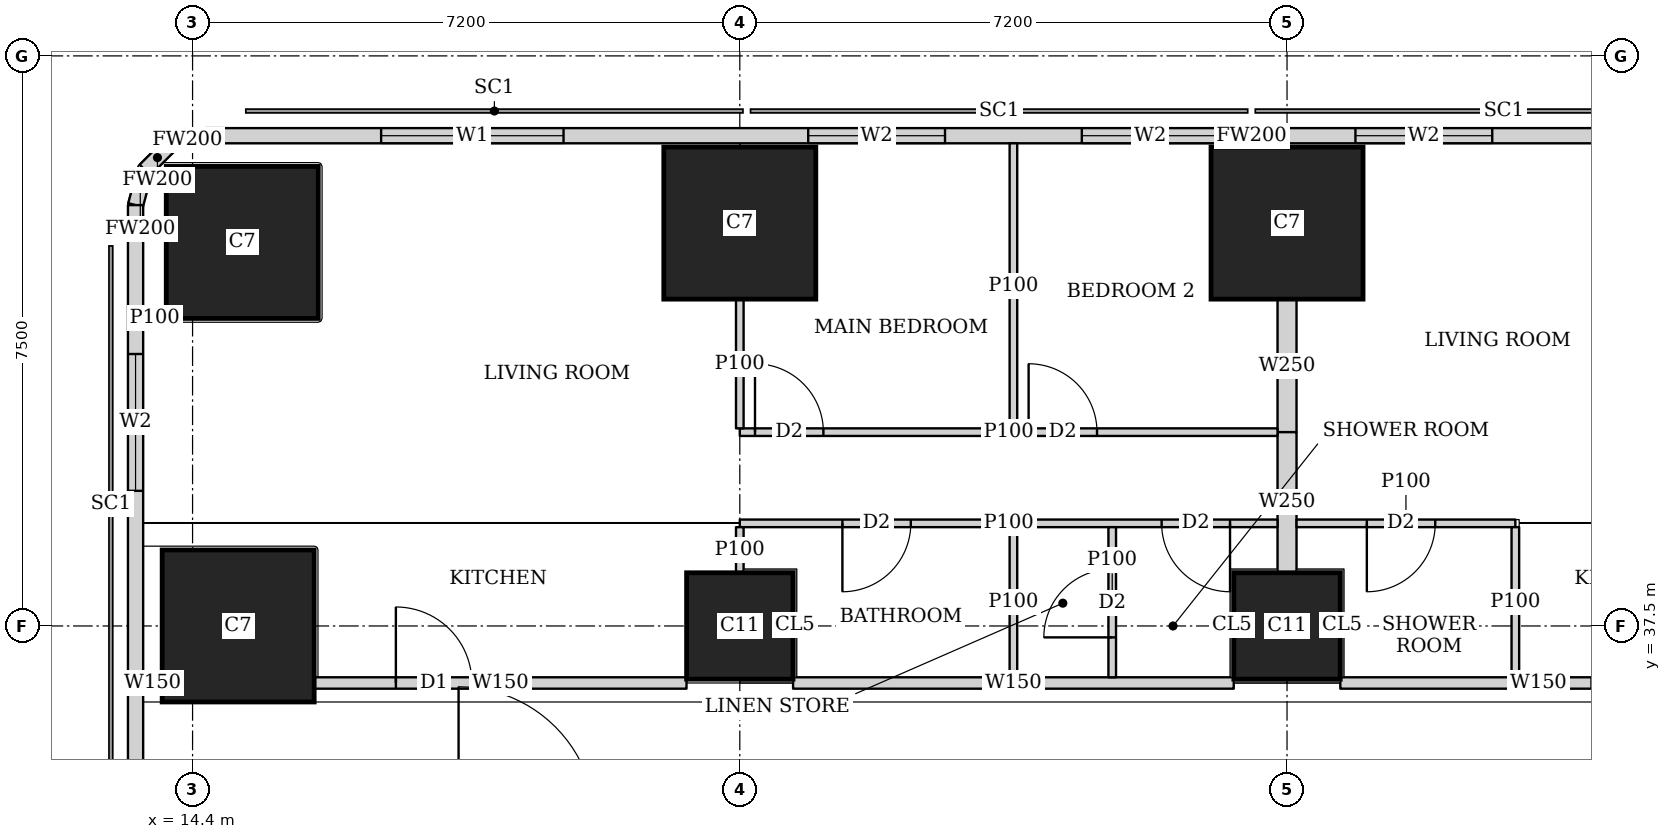
"""IFC4 building model, lengths in metres.
Left out: names, types, materials, properties, quantities, classifications, styles, units other than length and angle.
Written with IfcOpenShell. Run it as: python <this file> out.ifc"""

import sys

from ifc_helpers import new_model, si_unit, direction, frame, frame_2d, origin, origin_2d, place, context, subcontext, project, spatial, rectangle, extrude, element, fill, save


model = new_model("IFC4")
c1 = context("Model", 3, precision=1e-05, world=origin(), true_north=direction((0.0, 1.0)))
c2 = subcontext(c1, "Body", "Model", "MODEL_VIEW")
j1 = project(units=[si_unit("LENGTHUNIT", "METRE"), si_unit("PLANEANGLEUNIT", "RADIAN")], contexts=[c1])
p1 = place(None, origin())
s1 = spatial("IfcSite", under=j1, at=p1, CompositionType="ELEMENT")
p2 = place(p1, origin())
s2 = spatial("IfcBuilding", under=s1, at=p2, CompositionType="ELEMENT")
p3 = place(p2, frame((0.0, 0.0, 274.1)))
s3 = spatial("IfcBuildingStorey", under=s2, at=p3, CompositionType="ELEMENT", Elevation=274.1)
p4 = place(p3, frame((15.0, 37.5, 0.0), z_axis=(0.0, 0.0, 1.0), x_axis=(1.0, 0.0, 0.0)))
e1 = element("IfcColumn", 1, at=p4, inside=s3, PredefinedType="COLUMN", context=c2, shape_type="SweptSolid", body=[
    extrude(rectangle(XDim=2.0, YDim=2.0, at=origin_2d()), origin(), (0.0, 0.0, 1.0), 3.75),
])
for number, where, z_axis, x_axis in (
    (2, (21.6, 37.5, 0.0), (0.0, 0.0, 1.0), (1.0, 0.0, 0.0)),
    (3, (28.8, 37.5, 0.0), (0.0, 0.0, 1.0), (1.0, 0.0, 0.0)),
):
    element("IfcColumn", number, at=place(p3, frame(where, z_axis=z_axis, x_axis=x_axis)), inside=s3, PredefinedType="COLUMN", context=c2, shape_type="SweptSolid", body=[
        extrude(rectangle(XDim=1.4, YDim=1.4, at=origin_2d()), origin(), (0.0, 0.0, 1.0), 3.75),
    ])
for number, where, z_axis, x_axis in (
    (4, (15.054, 42.546, 0.0), (0.0, 0.0, 1.0), (1.0, 0.0, 0.0)),
    (5, (21.6, 42.8, 0.0), (0.0, 0.0, 1.0), (1.0, 0.0, 0.0)),
    (6, (28.8, 42.8, 0.0), (0.0, 0.0, 1.0), (1.0, 0.0, 0.0)),
):
    element("IfcColumn", number, at=place(p3, frame(where, z_axis=z_axis, x_axis=x_axis)), inside=s3, PredefinedType="COLUMN", context=c2, shape_type="SweptSolid", body=[
        extrude(rectangle(XDim=2.0, YDim=2.0, at=origin_2d()), origin(), (0.0, 0.0, 1.0), 3.75),
    ])
p5 = place(p3, frame((42.103, 43.95, 0.0), z_axis=(0.0, 0.0, 1.0), x_axis=(-1.0, 0.0, 0.0)))
e7 = element("IfcWall", 7, at=p5, inside=s3, PredefinedType="SOLIDWALL", context=c2, shape_type="SweptSolid", body=[
    extrude(rectangle(XDim=27.54, YDim=0.2, at=frame_2d((13.77, 0.0))), origin(), (0.0, 0.0, 1.0), 3.5),
])
p6 = place(p5, frame((10.603, 0.0, 0.9)))
e8 = element("IfcOpeningElement", 8, at=p6, cuts=e7, PredefinedType="OPENING", context=c2, shape_type="SweptSolid", body=[
    extrude(rectangle(XDim=1.8, YDim=1.5, at=frame_2d((0.9, 0.75))), frame((0.0, 0.11, 0.0), z_axis=(0.0, -1.0, 0.0), x_axis=(1.0, 0.0, 0.0)), (0.0, 0.0, 1.0), 0.22),
])
p7 = place(p5, frame((14.203, 0.0, 0.9)))
e9 = element("IfcOpeningElement", 9, at=p7, cuts=e7, PredefinedType="OPENING", context=c2, shape_type="SweptSolid", body=[
    extrude(rectangle(XDim=1.8, YDim=1.5, at=frame_2d((0.9, 0.75))), frame((0.0, 0.11, 0.0), z_axis=(0.0, -1.0, 0.0), x_axis=(1.0, 0.0, 0.0)), (0.0, 0.0, 1.0), 0.22),
])
p8 = place(p5, frame((17.803, 0.0, 0.9)))
e10 = element("IfcOpeningElement", 10, at=p8, cuts=e7, PredefinedType="OPENING", context=c2, shape_type="SweptSolid", body=[
    extrude(rectangle(XDim=1.8, YDim=1.5, at=frame_2d((0.9, 0.75))), frame((0.0, 0.11, 0.0), z_axis=(0.0, -1.0, 0.0), x_axis=(1.0, 0.0, 0.0)), (0.0, 0.0, 1.0), 0.22),
])
p9 = place(p5, frame((22.822, 0.0, 0.9)))
e11 = element("IfcOpeningElement", 11, at=p9, cuts=e7, PredefinedType="OPENING", context=c2, shape_type="SweptSolid", body=[
    extrude(rectangle(XDim=2.4, YDim=1.5, at=frame_2d((1.2, 0.75))), frame((0.0, 0.11, 0.0), z_axis=(0.0, -1.0, 0.0), x_axis=(1.0, 0.0, 0.0)), (0.0, 0.0, 1.0), 0.22),
])
p10 = place(p3, frame((14.563, 43.95, 0.0), z_axis=(0.0, 0.0, 1.0), x_axis=(-0.965655254015, -0.259826731483, 0.0)))
e12 = element("IfcWall", 12, at=p10, inside=s3, PredefinedType="SOLIDWALL", context=c2, shape_type="SweptSolid", body=[
    extrude(rectangle(XDim=0.477, YDim=0.2, at=frame_2d((0.239, 0.0))), origin(), (0.0, 0.0, 1.0), 3.5),
])
p11 = place(p3, frame((14.102, 43.826, 0.0), z_axis=(0.0, 0.0, 1.0), x_axis=(-0.707369890659, -0.706843573776, 0.0)))
e13 = element("IfcWall", 13, at=p11, inside=s3, PredefinedType="SOLIDWALL", context=c2, shape_type="SweptSolid", body=[
    extrude(rectangle(XDim=0.464, YDim=0.2, at=frame_2d((0.232, 0.0))), origin(), (0.0, 0.0, 1.0), 3.5),
])
p12 = place(p3, frame((13.774, 43.498, 0.0), z_axis=(0.0, 0.0, 1.0), x_axis=(-0.259826731483, -0.965655254015, 0.0)))
e14 = element("IfcWall", 14, at=p12, inside=s3, PredefinedType="SOLIDWALL", context=c2, shape_type="SweptSolid", body=[
    extrude(rectangle(XDim=0.477, YDim=0.2, at=frame_2d((0.239, 0.0))), origin(), (0.0, 0.0, 1.0), 3.5),
])
p13 = place(p3, frame((13.65, 43.037, 0.0), z_axis=(0.0, 0.0, 1.0), x_axis=(0.0, -1.0, 0.0)))
e15 = element("IfcWall", 15, at=p13, inside=s3, PredefinedType="SOLIDWALL", context=c2, shape_type="SweptSolid", body=[
    extrude(rectangle(XDim=35.374, YDim=0.2, at=frame_2d((17.687, 0.0))), origin(), (0.0, 0.0, 1.0), 3.5),
])
p14 = place(p13, frame((1.959, 0.0, 0.9)))
e16 = element("IfcOpeningElement", 16, at=p14, cuts=e15, PredefinedType="OPENING", context=c2, shape_type="SweptSolid", body=[
    extrude(rectangle(XDim=1.8, YDim=1.5, at=frame_2d((0.9, 0.75))), frame((0.0, 0.11, 0.0), z_axis=(0.0, -1.0, 0.0), x_axis=(1.0, 0.0, 0.0)), (0.0, 0.0, 1.0), 0.22),
])
p15 = place(p3, frame((13.75, 36.75, 0.0), z_axis=(0.0, 0.0, 1.0), x_axis=(1.0, 0.0, 0.0)))
e17 = element("IfcWall", 17, at=p15, inside=s3, PredefinedType="SOLIDWALL", context=c2, shape_type="SweptSolid", body=[
    extrude(rectangle(XDim=0.249, YDim=0.15, at=frame_2d((0.125, 0.0))), origin(), (0.0, 0.0, 1.0), 3.5),
])
p16 = place(p3, frame((16.001, 36.75, 0.0), z_axis=(0.0, 0.0, 1.0), x_axis=(1.0, 0.0, 0.0)))
e18 = element("IfcWall", 18, at=p16, inside=s3, PredefinedType="SOLIDWALL", context=c2, shape_type="SweptSolid", body=[
    extrude(rectangle(XDim=4.898, YDim=0.15, at=frame_2d((2.449, 0.0))), origin(), (0.0, 0.0, 1.0), 3.5),
])
p17 = place(p16, frame((1.074, 0.0, 0.0)))
e19 = element("IfcOpeningElement", 19, at=p17, cuts=e18, PredefinedType="OPENING", context=c2, shape_type="SweptSolid", body=[
    extrude(rectangle(XDim=1.0, YDim=2.1, at=frame_2d((0.5, 1.05))), frame((0.0, 0.085, 0.0), z_axis=(0.0, -1.0, 0.0), x_axis=(1.0, 0.0, 0.0)), (0.0, 0.0, 1.0), 0.17),
])
p18 = place(p3, frame((22.301, 36.75, 0.0), z_axis=(0.0, 0.0, 1.0), x_axis=(1.0, 0.0, 0.0)))
e20 = element("IfcWall", 20, at=p18, inside=s3, PredefinedType="SOLIDWALL", context=c2, shape_type="SweptSolid", body=[
    extrude(rectangle(XDim=5.798, YDim=0.15, at=frame_2d((2.899, 0.0))), origin(), (0.0, 0.0, 1.0), 3.5),
])
p19 = place(p3, frame((29.501, 36.75, 0.0), z_axis=(0.0, 0.0, 1.0), x_axis=(1.0, 0.0, 0.0)))
e21 = element("IfcWall", 21, at=p19, inside=s3, PredefinedType="SOLIDWALL", context=c2, shape_type="SweptSolid", body=[
    extrude(rectangle(XDim=5.216, YDim=0.15, at=frame_2d((2.608, 0.0))), origin(), (0.0, 0.0, 1.0), 3.5),
])
p20 = place(p19, frame((3.305, 0.0, 0.0)))
e22 = element("IfcOpeningElement", 22, at=p20, cuts=e21, PredefinedType="OPENING", context=c2, shape_type="SweptSolid", body=[
    extrude(rectangle(XDim=1.0, YDim=2.1, at=frame_2d((0.5, 1.05))), frame((0.0, 0.085, 0.0), z_axis=(0.0, -1.0, 0.0), x_axis=(1.0, 0.0, 0.0)), (0.0, 0.0, 1.0), 0.17),
])
p21 = place(p3, frame((14.054, 41.546, 0.0), z_axis=(0.0, 0.0, 1.0), x_axis=(-1.0, 0.0, 0.0)))
e23 = element("IfcWall", 23, at=p21, inside=s3, PredefinedType="PARTITIONING", context=c2, shape_type="SweptSolid", body=[
    extrude(rectangle(XDim=0.304, YDim=0.1, at=frame_2d((0.152, 0.0))), origin(), (0.0, 0.0, 1.0), 3.5),
])
p22 = place(p3, frame((21.6, 40.05, 0.0), z_axis=(0.0, 0.0, 1.0), x_axis=(1.0, 0.0, 0.0)))
e24 = element("IfcWall", 24, at=p22, inside=s3, PredefinedType="PARTITIONING", context=c2, shape_type="SweptSolid", body=[
    extrude(rectangle(XDim=7.075, YDim=0.1, at=frame_2d((3.538, 0.0))), origin(), (0.0, 0.0, 1.0), 3.5),
])
p23 = place(p22, frame((0.2, 0.0, 0.0)))
e25 = element("IfcOpeningElement", 25, at=p23, cuts=e24, PredefinedType="OPENING", context=c2, shape_type="SweptSolid", body=[
    extrude(rectangle(XDim=0.9, YDim=2.1, at=frame_2d((0.45, 1.05))), frame((0.0, 0.06, 0.0), z_axis=(0.0, -1.0, 0.0), x_axis=(1.0, 0.0, 0.0)), (0.0, 0.0, 1.0), 0.12),
])
p24 = place(p22, frame((3.8, 0.0, 0.0)))
e26 = element("IfcOpeningElement", 26, at=p24, cuts=e24, PredefinedType="OPENING", context=c2, shape_type="SweptSolid", body=[
    extrude(rectangle(XDim=0.9, YDim=2.1, at=frame_2d((0.45, 1.05))), frame((0.0, 0.06, 0.0), z_axis=(0.0, -1.0, 0.0), x_axis=(1.0, 0.0, 0.0)), (0.0, 0.0, 1.0), 0.12),
])
p25 = place(p3, frame((21.6, 38.85, 0.0), z_axis=(0.0, 0.0, 1.0), x_axis=(1.0, 0.0, 0.0)))
e27 = element("IfcWall", 27, at=p25, inside=s3, PredefinedType="PARTITIONING", context=c2, shape_type="SweptSolid", body=[
    extrude(rectangle(XDim=7.075, YDim=0.1, at=frame_2d((3.538, 0.0))), origin(), (0.0, 0.0, 1.0), 3.5),
])
p26 = place(p25, frame((1.35, 0.0, 0.0)))
e28 = element("IfcOpeningElement", 28, at=p26, cuts=e27, PredefinedType="OPENING", context=c2, shape_type="SweptSolid", body=[
    extrude(rectangle(XDim=0.9, YDim=2.1, at=frame_2d((0.45, 1.05))), frame((0.0, 0.06, 0.0), z_axis=(0.0, -1.0, 0.0), x_axis=(1.0, 0.0, 0.0)), (0.0, 0.0, 1.0), 0.12),
])
p27 = place(p25, frame((5.55, 0.0, 0.0)))
e29 = element("IfcOpeningElement", 29, at=p27, cuts=e27, PredefinedType="OPENING", context=c2, shape_type="SweptSolid", body=[
    extrude(rectangle(XDim=0.9, YDim=2.1, at=frame_2d((0.45, 1.05))), frame((0.0, 0.06, 0.0), z_axis=(0.0, -1.0, 0.0), x_axis=(1.0, 0.0, 0.0)), (0.0, 0.0, 1.0), 0.12),
])
p28 = place(p3, frame((21.6, 40.1, 0.0), z_axis=(0.0, 0.0, 1.0), x_axis=(0.0, 1.0, 0.0)))
e30 = element("IfcWall", 30, at=p28, inside=s3, PredefinedType="PARTITIONING", context=c2, shape_type="SweptSolid", body=[
    extrude(rectangle(XDim=1.699, YDim=0.1, at=frame_2d((0.85, 0.0))), origin(), (0.0, 0.0, 1.0), 3.5),
])
p29 = place(p3, frame((25.2, 40.1, 0.0), z_axis=(0.0, 0.0, 1.0), x_axis=(0.0, 1.0, 0.0)))
e31 = element("IfcWall", 31, at=p29, inside=s3, PredefinedType="PARTITIONING", context=c2, shape_type="SweptSolid", body=[
    extrude(rectangle(XDim=3.75, YDim=0.1, at=frame_2d((1.875, 0.0))), origin(), (0.0, 0.0, 1.0), 2.05),
])
p30 = place(p3, frame((21.6, 38.201, 0.0), z_axis=(0.0, 0.0, 1.0), x_axis=(0.0, 1.0, 0.0)))
e32 = element("IfcWall", 32, at=p30, inside=s3, PredefinedType="PARTITIONING", context=c2, shape_type="SweptSolid", body=[
    extrude(rectangle(XDim=0.599, YDim=0.1, at=frame_2d((0.3, 0.0))), origin(), (0.0, 0.0, 1.0), 3.5),
])
p31 = place(p3, frame((25.2, 36.825, 0.0), z_axis=(0.0, 0.0, 1.0), x_axis=(0.0, 1.0, 0.0)))
e33 = element("IfcWall", 33, at=p31, inside=s3, PredefinedType="PARTITIONING", context=c2, shape_type="SweptSolid", body=[
    extrude(rectangle(XDim=1.975, YDim=0.1, at=frame_2d((0.988, 0.0))), origin(), (0.0, 0.0, 1.0), 3.5),
])
p32 = place(p3, frame((26.5, 36.825, 0.0), z_axis=(0.0, 0.0, 1.0), x_axis=(0.0, 1.0, 0.0)))
e34 = element("IfcWall", 34, at=p32, inside=s3, PredefinedType="PARTITIONING", context=c2, shape_type="SweptSolid", body=[
    extrude(rectangle(XDim=1.975, YDim=0.1, at=frame_2d((0.988, 0.0))), origin(), (0.0, 0.0, 1.0), 3.5),
])
p33 = place(p32, frame((0.525, 0.0, 0.0)))
e35 = element("IfcOpeningElement", 35, at=p33, cuts=e34, PredefinedType="OPENING", context=c2, shape_type="SweptSolid", body=[
    extrude(rectangle(XDim=0.9, YDim=2.1, at=frame_2d((0.45, 1.05))), frame((0.0, 0.06, 0.0), z_axis=(0.0, -1.0, 0.0), x_axis=(1.0, 0.0, 0.0)), (0.0, 0.0, 1.0), 0.12),
])
p34 = place(p3, frame((28.925, 38.85, 0.0), z_axis=(0.0, 0.0, 1.0), x_axis=(1.0, 0.0, 0.0)))
e36 = element("IfcWall", 36, at=p34, inside=s3, PredefinedType="PARTITIONING", context=c2, shape_type="SweptSolid", body=[
    extrude(rectangle(XDim=2.879, YDim=0.1, at=frame_2d((1.439, 0.0))), origin(), (0.0, 0.0, 1.0), 3.5),
])
p35 = place(p34, frame((0.925, 0.0, 0.0)))
e37 = element("IfcOpeningElement", 37, at=p35, cuts=e36, PredefinedType="OPENING", context=c2, shape_type="SweptSolid", body=[
    extrude(rectangle(XDim=0.9, YDim=2.1, at=frame_2d((0.45, 1.05))), frame((0.0, 0.06, 0.0), z_axis=(0.0, -1.0, 0.0), x_axis=(1.0, 0.0, 0.0)), (0.0, 0.0, 1.0), 0.12),
])
p36 = place(p3, frame((31.804, 36.825, 0.0), z_axis=(0.0, 0.0, 1.0), x_axis=(0.0, 1.0, 0.0)))
e38 = element("IfcWall", 38, at=p36, inside=s3, PredefinedType="PARTITIONING", context=c2, shape_type="SweptSolid", body=[
    extrude(rectangle(XDim=1.975, YDim=0.1, at=frame_2d((0.988, 0.0))), origin(), (0.0, 0.0, 1.0), 3.5),
])
p37 = place(p3, frame((28.8, 40.05, 0.0), z_axis=(0.0, 0.0, 1.0), x_axis=(0.0, 1.0, 0.0)))
e39 = element("IfcWall", 39, at=p37, inside=s3, PredefinedType="SOLIDWALL", context=c2, shape_type="SweptSolid", body=[
    extrude(rectangle(XDim=1.749, YDim=0.25, at=frame_2d((0.875, 0.0))), origin(), (0.0, 0.0, 1.0), 3.5),
])
p38 = place(p3, frame((28.8, 38.201, 0.0), z_axis=(0.0, 0.0, 1.0), x_axis=(0.0, 1.0, 0.0)))
e40 = element("IfcWall", 40, at=p38, inside=s3, PredefinedType="SOLIDWALL", context=c2, shape_type="SweptSolid", body=[
    extrude(rectangle(XDim=1.849, YDim=0.25, at=frame_2d((0.925, 0.0))), origin(), (0.0, 0.0, 1.0), 3.5),
])
p39 = place(p6, origin())
e41 = element("IfcWindow", 41, at=p39, inside=s3, PartitioningType="SINGLE_PANEL", PredefinedType="WINDOW", context=c2, shape_type="SweptSolid", body=[
    extrude(rectangle(XDim=1.8, YDim=1.5, at=frame_2d((0.9, 0.75))), frame((0.0, 0.03, 0.0), z_axis=(0.0, -1.0, 0.0), x_axis=(1.0, 0.0, 0.0)), (0.0, 0.0, 1.0), 0.06),
])
fill(e8, e41)
p40 = place(p7, origin())
e42 = element("IfcWindow", 42, at=p40, inside=s3, PartitioningType="SINGLE_PANEL", PredefinedType="WINDOW", context=c2, shape_type="SweptSolid", body=[
    extrude(rectangle(XDim=1.8, YDim=1.5, at=frame_2d((0.9, 0.75))), frame((0.0, 0.03, 0.0), z_axis=(0.0, -1.0, 0.0), x_axis=(1.0, 0.0, 0.0)), (0.0, 0.0, 1.0), 0.06),
])
fill(e9, e42)
p41 = place(p8, origin())
e43 = element("IfcWindow", 43, at=p41, inside=s3, PartitioningType="SINGLE_PANEL", PredefinedType="WINDOW", context=c2, shape_type="SweptSolid", body=[
    extrude(rectangle(XDim=1.8, YDim=1.5, at=frame_2d((0.9, 0.75))), frame((0.0, 0.03, 0.0), z_axis=(0.0, -1.0, 0.0), x_axis=(1.0, 0.0, 0.0)), (0.0, 0.0, 1.0), 0.06),
])
fill(e10, e43)
p42 = place(p9, origin())
e44 = element("IfcWindow", 44, at=p42, inside=s3, PartitioningType="SINGLE_PANEL", PredefinedType="WINDOW", context=c2, shape_type="SweptSolid", body=[
    extrude(rectangle(XDim=2.4, YDim=1.5, at=frame_2d((1.2, 0.75))), frame((0.0, 0.03, 0.0), z_axis=(0.0, -1.0, 0.0), x_axis=(1.0, 0.0, 0.0)), (0.0, 0.0, 1.0), 0.06),
])
fill(e11, e44)
p43 = place(p14, origin())
e45 = element("IfcWindow", 45, at=p43, inside=s3, PartitioningType="SINGLE_PANEL", PredefinedType="WINDOW", context=c2, shape_type="SweptSolid", body=[
    extrude(rectangle(XDim=1.8, YDim=1.5, at=frame_2d((0.9, 0.75))), frame((0.0, 0.03, 0.0), z_axis=(0.0, -1.0, 0.0), x_axis=(1.0, 0.0, 0.0)), (0.0, 0.0, 1.0), 0.06),
])
fill(e16, e45)
p44 = place(p23, origin())
e46 = element("IfcDoor", 46, at=p44, inside=s3, OperationType="SINGLE_SWING_LEFT", PredefinedType="DOOR", context=c2, shape_type="SweptSolid", body=[
    extrude(rectangle(XDim=0.9, YDim=2.1, at=frame_2d((0.45, 1.05))), frame((0.0, 0.025, 0.0), z_axis=(0.0, -1.0, 0.0), x_axis=(1.0, 0.0, 0.0)), (0.0, 0.0, 1.0), 0.05),
])
fill(e25, e46)
p45 = place(p24, origin())
e47 = element("IfcDoor", 47, at=p45, inside=s3, OperationType="SINGLE_SWING_LEFT", PredefinedType="DOOR", context=c2, shape_type="SweptSolid", body=[
    extrude(rectangle(XDim=0.9, YDim=2.1, at=frame_2d((0.45, 1.05))), frame((0.0, 0.025, 0.0), z_axis=(0.0, -1.0, 0.0), x_axis=(1.0, 0.0, 0.0)), (0.0, 0.0, 1.0), 0.05),
])
fill(e26, e47)
p46 = place(p26, origin())
e48 = element("IfcDoor", 48, at=p46, inside=s3, OperationType="SINGLE_SWING_RIGHT", PredefinedType="DOOR", context=c2, shape_type="SweptSolid", body=[
    extrude(rectangle(XDim=0.9, YDim=2.1, at=frame_2d((0.45, 1.05))), frame((0.0, 0.025, 0.0), z_axis=(0.0, -1.0, 0.0), x_axis=(1.0, 0.0, 0.0)), (0.0, 0.0, 1.0), 0.05),
])
fill(e28, e48)
p47 = place(p27, origin())
e49 = element("IfcDoor", 49, at=p47, inside=s3, OperationType="SINGLE_SWING_LEFT", PredefinedType="DOOR", context=c2, shape_type="SweptSolid", body=[
    extrude(rectangle(XDim=0.9, YDim=2.1, at=frame_2d((0.45, 1.05))), frame((0.0, 0.025, 0.0), z_axis=(0.0, -1.0, 0.0), x_axis=(1.0, 0.0, 0.0)), (0.0, 0.0, 1.0), 0.05),
])
fill(e29, e49)
p48 = place(p33, origin())
e50 = element("IfcDoor", 50, at=p48, inside=s3, OperationType="SINGLE_SWING_LEFT", PredefinedType="DOOR", context=c2, shape_type="SweptSolid", body=[
    extrude(rectangle(XDim=0.9, YDim=2.1, at=frame_2d((0.45, 1.05))), frame((0.0, 0.025, 0.0), z_axis=(0.0, -1.0, 0.0), x_axis=(1.0, 0.0, 0.0)), (0.0, 0.0, 1.0), 0.05),
])
fill(e35, e50)
p49 = place(p17, origin())
e51 = element("IfcDoor", 51, at=p49, inside=s3, OperationType="SINGLE_SWING_LEFT", PredefinedType="DOOR", context=c2, shape_type="SweptSolid", body=[
    extrude(rectangle(XDim=1.0, YDim=2.1, at=frame_2d((0.5, 1.05))), frame((0.0, 0.025, 0.0), z_axis=(0.0, -1.0, 0.0), x_axis=(1.0, 0.0, 0.0)), (0.0, 0.0, 1.0), 0.05),
])
fill(e19, e51)
p50 = place(p35, origin())
e52 = element("IfcDoor", 52, at=p50, inside=s3, OperationType="SINGLE_SWING_RIGHT", PredefinedType="DOOR", context=c2, shape_type="SweptSolid", body=[
    extrude(rectangle(XDim=0.9, YDim=2.1, at=frame_2d((0.45, 1.05))), frame((0.0, 0.025, 0.0), z_axis=(0.0, -1.0, 0.0), x_axis=(1.0, 0.0, 0.0)), (0.0, 0.0, 1.0), 0.05),
])
fill(e37, e52)
save(model, sys.argv[1])
